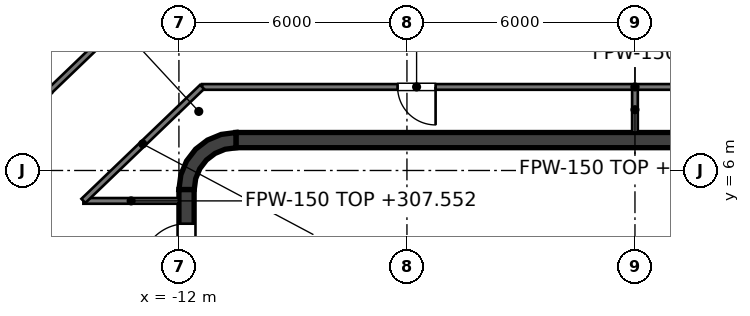
"""IFC4 building model, lengths in metres.
Left out: names, types, materials, properties, quantities, classifications, styles, units other than length and angle.
Written with IfcOpenShell. Run it as: python <this file> out.ifc"""

import sys

from ifc_helpers import new_model, si_unit, direction, frame, frame_2d, origin, place, context, subcontext, project, spatial, polyline, rectangle, outline, extrude, element, fill, save


model = new_model("IFC4")
c1 = context("Model", 3, precision=1e-05, world=origin(), true_north=direction((0.0, 1.0)))
c2 = subcontext(c1, "Body", "Model", "MODEL_VIEW")
j1 = project(units=[si_unit("LENGTHUNIT", "METRE"), si_unit("PLANEANGLEUNIT", "RADIAN")], contexts=[c1])
p1 = place(None, origin())
s1 = spatial("IfcSite", under=j1, at=p1, CompositionType="ELEMENT")
p2 = place(p1, origin())
s2 = spatial("IfcBuilding", under=s1, at=p2, CompositionType="ELEMENT")
p3 = place(p2, frame((0.0, 0.0, 304.4)))
s3 = spatial("IfcBuildingStorey", under=s2, at=p3, CompositionType="ELEMENT", Elevation=304.4)
p4 = place(p3, frame((-10.5, 6.8, 0.0), z_axis=(0.0, 0.0, 1.0), x_axis=(1.0, 0.0, 0.0)))
e1 = element("IfcWall", 1, at=p4, inside=s3, PredefinedType="SHEAR", context=c2, shape_type="SweptSolid", body=[
    extrude(rectangle(XDim=21.0, YDim=0.4, at=frame_2d((10.5, 0.0))), origin(), (0.0, 0.0, 1.0), 4.0),
])
p5 = place(p3, frame((-11.8, -5.5, 0.0), z_axis=(0.0, 0.0, 1.0), x_axis=(0.0, 1.0, 0.0)))
e2 = element("IfcWall", 2, at=p5, inside=s3, PredefinedType="SHEAR", context=c2, shape_type="SweptSolid", body=[
    extrude(rectangle(XDim=11.0, YDim=0.4, at=frame_2d((5.5, 0.0))), origin(), (0.0, 0.0, 1.0), 4.0),
])
p6 = place(p5, frame((3.8, 0.0, 0.0)))
e3 = element("IfcOpeningElement", 3, at=p6, cuts=e2, PredefinedType="OPENING", context=c2, shape_type="SweptSolid", body=[
    extrude(rectangle(XDim=1.0, YDim=2.1, at=frame_2d((0.5, 1.05))), frame((0.0, 0.2, 0.0), z_axis=(0.0, -1.0, 0.0), x_axis=(1.0, 0.0, 0.0)), (0.0, 0.0, 1.0), 0.4),
])
p7 = place(p5, frame((6.7, 0.0, 0.0)))
e4 = element("IfcOpeningElement", 4, at=p7, cuts=e2, PredefinedType="OPENING", context=c2, shape_type="SweptSolid", body=[
    extrude(rectangle(XDim=1.0, YDim=2.1, at=frame_2d((0.5, 1.05))), frame((0.0, 0.2, 0.0), z_axis=(0.0, -1.0, 0.0), x_axis=(1.0, 0.0, 0.0)), (0.0, 0.0, 1.0), 0.4),
])
p8 = place(p5, frame((0.9, 0.0, 0.0)))
e5 = element("IfcOpeningElement", 5, at=p8, cuts=e2, PredefinedType="OPENING", context=c2, shape_type="SweptSolid", body=[
    extrude(rectangle(XDim=1.2, YDim=2.1, at=frame_2d((0.6, 1.05))), frame((0.0, 0.2, 0.0), z_axis=(0.0, -1.0, 0.0), x_axis=(1.0, 0.0, 0.0)), (0.0, 0.0, 1.0), 0.4),
])
p9 = place(p5, frame((8.9, 0.0, 0.0)))
e6 = element("IfcOpeningElement", 6, at=p9, cuts=e2, PredefinedType="OPENING", context=c2, shape_type="SweptSolid", body=[
    extrude(rectangle(XDim=1.2, YDim=2.1, at=frame_2d((0.6, 1.05))), frame((0.0, 0.2, 0.0), z_axis=(0.0, -1.0, 0.0), x_axis=(1.0, 0.0, 0.0)), (0.0, 0.0, 1.0), 0.4),
])
p10 = place(p3, origin())
e7 = element("IfcWall", 7, at=p10, inside=s3, PredefinedType="SHEAR", context=c2, shape_type="SweptSolid", body=[
    extrude(outline(polyline([(-12.0, 5.5), (-11.596, 5.5), (-11.559, 5.784), (-11.45, 6.048), (-11.275, 6.275), (-11.048, 6.45), (-10.784, 6.559), (-10.5, 6.596), (-10.5, 7.0), (-10.888, 6.949), (-11.25, 6.799), (-11.561, 6.561), (-11.799, 6.25), (-11.949, 5.888), (-12.0, 5.5)])), origin(), (0.0, 0.0, 1.0), 4.0),
])
p11 = place(p3, frame((-1.5, 4.1, 0.0), z_axis=(0.0, 0.0, 1.0), x_axis=(0.0, 1.0, 0.0)))
e8 = element("IfcWall", 8, at=p11, inside=s3, PredefinedType="PARTITIONING", context=c2, shape_type="SweptSolid", body=[
    extrude(rectangle(XDim=2.5, YDim=0.15, at=frame_2d((1.25, 0.0))), origin(), (0.0, 0.0, 1.0), 3.85),
])
p12 = place(p11, frame((0.8, 0.0, 0.0)))
e9 = element("IfcOpeningElement", 9, at=p12, cuts=e8, PredefinedType="OPENING", context=c2, shape_type="SweptSolid", body=[
    extrude(rectangle(XDim=0.9, YDim=2.1, at=frame_2d((0.45, 1.05))), frame((0.0, 0.075, 0.0), z_axis=(0.0, -1.0, 0.0), x_axis=(1.0, 0.0, 0.0)), (0.0, 0.0, 1.0), 0.15),
])
p13 = place(p3, frame((-9.0, 4.1, 0.0), z_axis=(0.0, 0.0, 1.0), x_axis=(0.0, 1.0, 0.0)))
e10 = element("IfcWall", 10, at=p13, inside=s3, PredefinedType="SOLIDWALL", context=c2, shape_type="SweptSolid", body=[
    extrude(rectangle(XDim=2.5, YDim=0.25, at=frame_2d((1.25, 0.0))), origin(), (0.0, 0.0, 1.0), 3.85),
])
p14 = place(p13, frame((0.65, 0.0, 0.0)))
e11 = element("IfcOpeningElement", 11, at=p14, cuts=e10, PredefinedType="OPENING", context=c2, shape_type="SweptSolid", body=[
    extrude(rectangle(XDim=1.2, YDim=2.1, at=frame_2d((0.6, 1.05))), frame((0.0, 0.125, 0.0), z_axis=(0.0, -1.0, 0.0), x_axis=(1.0, 0.0, 0.0)), (0.0, 0.0, 1.0), 0.25),
])
p15 = place(p3, frame((-3.15, 4.1, 0.0), z_axis=(0.0, 0.0, 1.0), x_axis=(0.0, 1.0, 0.0)))
e12 = element("IfcWall", 12, at=p15, inside=s3, PredefinedType="SOLIDWALL", context=c2, shape_type="SweptSolid", body=[
    extrude(rectangle(XDim=2.5, YDim=0.25, at=frame_2d((1.25, 0.0))), origin(), (0.0, 0.0, 1.0), 3.85),
])
p16 = place(p3, frame((-14.514, 5.2, 0.0), z_axis=(0.0, 0.0, 1.0), x_axis=(1.0, 0.0, 0.0)))
e13 = element("IfcWall", 13, at=p16, inside=s3, PredefinedType="PARTITIONING", context=c2, shape_type="SweptSolid", body=[
    extrude(rectangle(XDim=2.514, YDim=0.15, at=frame_2d((1.257, 0.0))), origin(), (0.0, 0.0, 1.0), 3.152),
])
p17 = place(p3, frame((-11.391, 8.199, 0.0), z_axis=(0.0, 0.0, 1.0), x_axis=(1.0, 0.0, 0.0)))
e14 = element("IfcWall", 14, at=p17, inside=s3, PredefinedType="PARTITIONING", context=c2, shape_type="SweptSolid", body=[
    extrude(rectangle(XDim=22.782, YDim=0.15, at=frame_2d((11.391, 0.0))), origin(), (0.0, 0.0, 1.0), 2.927),
])
p18 = place(p17, frame((16.536, 0.0, 0.0)))
e15 = element("IfcOpeningElement", 15, at=p18, cuts=e14, PredefinedType="OPENING", context=c2, shape_type="SweptSolid", body=[
    extrude(rectangle(XDim=1.0, YDim=2.1, at=frame_2d((0.5, 1.05))), frame((0.0, 0.075, 0.0), z_axis=(0.0, -1.0, 0.0), x_axis=(1.0, 0.0, 0.0)), (0.0, 0.0, 1.0), 0.15),
])
p19 = place(p17, frame((5.145, 0.0, 0.0)))
e16 = element("IfcOpeningElement", 16, at=p19, cuts=e14, PredefinedType="OPENING", context=c2, shape_type="SweptSolid", body=[
    extrude(rectangle(XDim=1.0, YDim=2.1, at=frame_2d((0.5, 1.05))), frame((0.0, 0.075, 0.0), z_axis=(0.0, -1.0, 0.0), x_axis=(1.0, 0.0, 0.0)), (0.0, 0.0, 1.0), 0.15),
])
p20 = place(p3, frame((-14.514, 5.2, 0.0), z_axis=(0.0, 0.0, 1.0), x_axis=(0.721228427004, 0.692697304803, 0.0)))
e17 = element("IfcWall", 17, at=p20, inside=s3, PredefinedType="PARTITIONING", context=c2, shape_type="SweptSolid", body=[
    extrude(rectangle(XDim=4.33, YDim=0.15, at=frame_2d((2.165, 0.0))), origin(), (0.0, 0.0, 1.0), 3.076),
])
p21 = place(p3, frame((-18.95, 4.683, 0.0), z_axis=(0.0, 0.0, 1.0), x_axis=(0.721259541977, 0.692664906797, 0.0)))
e18 = element("IfcWall", 18, at=p21, inside=s3, PredefinedType="PARTITIONING", context=c2, shape_type="SweptSolid", body=[
    extrude(rectangle(XDim=8.973, YDim=0.15, at=frame_2d((4.487, 0.0))), origin(), (0.0, 0.0, 1.0), 2.995),
])
p22 = place(p21, frame((3.937, 0.0, 0.0)))
e19 = element("IfcOpeningElement", 19, at=p22, cuts=e18, PredefinedType="OPENING", context=c2, shape_type="SweptSolid", body=[
    extrude(rectangle(XDim=1.0, YDim=2.1, at=frame_2d((0.5, 1.05))), frame((0.0, 0.075, 0.0), z_axis=(0.0, -1.0, 0.0), x_axis=(1.0, 0.0, 0.0)), (0.0, 0.0, 1.0), 0.15),
])
p23 = place(p3, frame((0.0, 7.0, 0.0), z_axis=(0.0, 0.0, 1.0), x_axis=(0.0, 1.0, 0.0)))
e20 = element("IfcWall", 20, at=p23, inside=s3, PredefinedType="PARTITIONING", context=c2, shape_type="SweptSolid", body=[
    extrude(rectangle(XDim=1.199, YDim=0.15, at=frame_2d((0.6, 0.0))), origin(), (0.0, 0.0, 1.0), 2.995),
])
p24 = place(p3, frame((-22.35, 6.132, 0.0), z_axis=(0.0, 0.0, 1.0), x_axis=(0.721259864686, 0.692664570765, 0.0)))
e21 = element("IfcWall", 21, at=p24, inside=s3, PredefinedType="PARTITIONING", context=c2, shape_type="SweptSolid", body=[
    extrude(rectangle(XDim=11.791, YDim=0.1, at=frame_2d((5.896, 0.0))), origin(), (0.0, 0.0, 1.0), 2.995),
])
p25 = place(p24, frame((5.445, 0.0, 0.0)))
e22 = element("IfcOpeningElement", 22, at=p25, cuts=e21, PredefinedType="OPENING", context=c2, shape_type="SweptSolid", body=[
    extrude(rectangle(XDim=0.9, YDim=2.1, at=frame_2d((0.45, 1.05))), frame((0.0, 0.05, 0.0), z_axis=(0.0, -1.0, 0.0), x_axis=(1.0, 0.0, 0.0)), (0.0, 0.0, 1.0), 0.1),
])
p26 = place(p14, origin())
e23 = element("IfcDoor", 23, at=p26, inside=s3, OperationType="SINGLE_SWING_RIGHT", PredefinedType="DOOR", context=c2, shape_type="SweptSolid", body=[
    extrude(rectangle(XDim=1.2, YDim=2.1, at=frame_2d((0.6, 1.05))), frame((0.0, 0.025, 0.0), z_axis=(0.0, -1.0, 0.0), x_axis=(1.0, 0.0, 0.0)), (0.0, 0.0, 1.0), 0.05),
])
fill(e11, e23)
p27 = place(p12, origin())
e24 = element("IfcDoor", 24, at=p27, inside=s3, OperationType="SINGLE_SWING_LEFT", PredefinedType="DOOR", context=c2, shape_type="SweptSolid", body=[
    extrude(rectangle(XDim=0.9, YDim=2.1, at=frame_2d((0.45, 1.05))), frame((0.0, 0.025, 0.0), z_axis=(0.0, -1.0, 0.0), x_axis=(1.0, 0.0, 0.0)), (0.0, 0.0, 1.0), 0.05),
])
fill(e9, e24)
p28 = place(p9, origin())
e25 = element("IfcDoor", 25, at=p28, inside=s3, OperationType="SINGLE_SWING_LEFT", PredefinedType="DOOR", context=c2, shape_type="SweptSolid", body=[
    extrude(rectangle(XDim=1.2, YDim=2.1, at=frame_2d((0.6, 1.05))), frame((0.0, 0.025, 0.0), z_axis=(0.0, -1.0, 0.0), x_axis=(1.0, 0.0, 0.0)), (0.0, 0.0, 1.0), 0.05),
])
fill(e6, e25)
p29 = place(p19, origin())
e26 = element("IfcDoor", 26, at=p29, inside=s3, OperationType="SINGLE_SWING_RIGHT", PredefinedType="DOOR", context=c2, shape_type="SweptSolid", body=[
    extrude(rectangle(XDim=1.0, YDim=2.1, at=frame_2d((0.5, 1.05))), frame((0.0, 0.025, 0.0), z_axis=(0.0, -1.0, 0.0), x_axis=(1.0, 0.0, 0.0)), (0.0, 0.0, 1.0), 0.05),
])
fill(e16, e26)
save(model, sys.argv[1])
